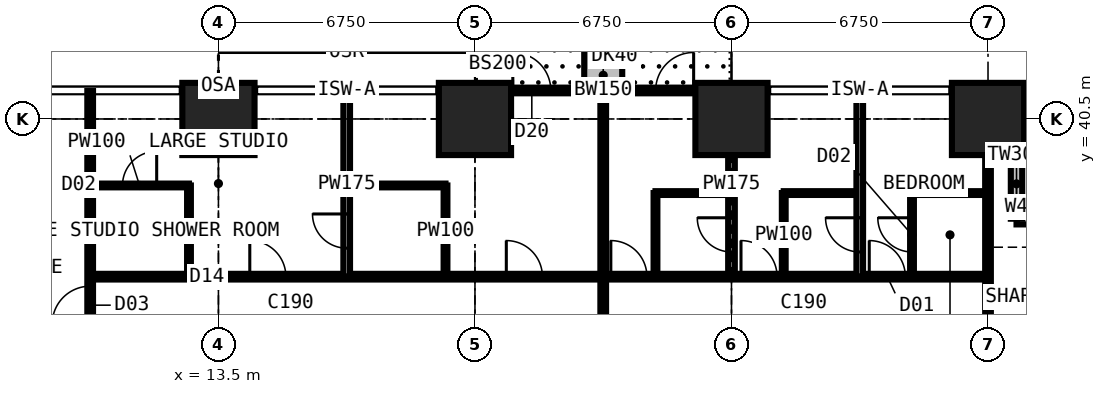
"""IFC4 building model, lengths in metres.
Left out: names, types, materials, properties, quantities, classifications, styles, units other than length and angle.
Written with IfcOpenShell. Run it as: python <this file> out.ifc"""

import sys

from ifc_helpers import new_model, si_unit, direction, frame, frame_2d, origin, origin_2d, place, context, subcontext, project, spatial, rectangle, extrude, element, fill, save


model = new_model("IFC4")
c1 = context("Model", 3, precision=1e-05, world=origin(), true_north=direction((0.0, 1.0)))
c2 = subcontext(c1, "Body", "Model", "MODEL_VIEW")
j1 = project(units=[si_unit("LENGTHUNIT", "METRE"), si_unit("PLANEANGLEUNIT", "RADIAN")], contexts=[c1])
p1 = place(None, origin())
s1 = spatial("IfcSite", under=j1, at=p1, CompositionType="ELEMENT")
p2 = place(p1, origin())
s2 = spatial("IfcBuilding", under=s1, at=p2, CompositionType="ELEMENT")
p3 = place(p2, frame((0.0, 0.0, 28.8)))
s3 = spatial("IfcBuildingStorey", under=s2, at=p3, CompositionType="ELEMENT", Elevation=28.8)
for number, where, z_axis, x_axis in (
    (1, (13.5, 40.5, 0.0), (0.0, 0.0, 1.0), (1.0, 0.0, 0.0)),
    (2, (20.25, 40.5, 0.0), (0.0, 0.0, 1.0), (1.0, 0.0, 0.0)),
    (3, (27.0, 40.5, 0.0), (0.0, 0.0, 1.0), (1.0, 0.0, 0.0)),
    (4, (33.75, 40.5, 0.0), (0.0, 0.0, 1.0), (1.0, 0.0, 0.0)),
):
    element("IfcColumn", number, at=place(p3, frame(where, z_axis=z_axis, x_axis=x_axis)), inside=s3, PredefinedType="COLUMN", context=c2, shape_type="SweptSolid", body=[
        extrude(rectangle(XDim=1.9, YDim=1.9, at=origin_2d()), origin(), (0.0, 0.0, 1.0), 3.6),
    ])
p4 = place(p3, frame((37.875, 37.875, 0.0), z_axis=(0.0, 0.0, 1.0), x_axis=(-1.0, 0.0, 0.0)))
e5 = element("IfcWall", 5, at=p4, inside=s3, PredefinedType="SOLIDWALL", context=c2, shape_type="SweptSolid", body=[
    extrude(rectangle(XDim=3.375, YDim=0.3, at=frame_2d((1.688, 0.0))), origin(), (0.0, 0.0, 1.0), 3.375),
])
p5 = place(p4, frame((0.788, 0.0, 0.6)))
e6 = element("IfcOpeningElement", 6, at=p5, cuts=e5, PredefinedType="OPENING", context=c2, shape_type="SweptSolid", body=[
    extrude(rectangle(XDim=1.8, YDim=2.1, at=frame_2d((0.9, 1.05))), frame((0.0, 0.16, 0.0), z_axis=(0.0, -1.0, 0.0), x_axis=(1.0, 0.0, 0.0)), (0.0, 0.0, 1.0), 0.32),
])
p6 = place(p3, frame((34.5, 37.875, 0.0), z_axis=(0.0, 0.0, 1.0), x_axis=(0.0, 1.0, 0.0)))
e7 = element("IfcWall", 7, at=p6, inside=s3, PredefinedType="SOLIDWALL", context=c2, shape_type="SweptSolid", body=[
    extrude(rectangle(XDim=3.375, YDim=0.3, at=frame_2d((1.688, 0.0))), origin(), (0.0, 0.0, 1.0), 3.375),
])
p7 = place(p6, frame((0.317, 0.0, 0.9)))
e8 = element("IfcOpeningElement", 8, at=p7, cuts=e7, PredefinedType="OPENING", context=c2, shape_type="SweptSolid", body=[
    extrude(rectangle(XDim=1.2, YDim=1.8, at=frame_2d((0.6, 0.9))), frame((0.0, 0.16, 0.0), z_axis=(0.0, -1.0, 0.0), x_axis=(1.0, 0.0, 0.0)), (0.0, 0.0, 1.0), 0.32),
])
p8 = place(p3, frame((20.25, 41.25, 0.0), z_axis=(0.0, 0.0, 1.0), x_axis=(1.0, 0.0, 0.0)))
e9 = element("IfcWall", 9, at=p8, inside=s3, PredefinedType="SOLIDWALL", context=c2, shape_type="SweptSolid", body=[
    extrude(rectangle(XDim=6.75, YDim=0.15, at=frame_2d((3.375, 0.0))), origin(), (0.0, 0.0, 1.0), 3.375),
])
p9 = place(p8, frame((0.996, 0.0, 0.0)))
e10 = element("IfcOpeningElement", 10, at=p9, cuts=e9, PredefinedType="OPENING", context=c2, shape_type="SweptSolid", body=[
    extrude(rectangle(XDim=1.0, YDim=2.2, at=frame_2d((0.5, 1.1))), frame((0.0, 0.085, 0.0), z_axis=(0.0, -1.0, 0.0), x_axis=(1.0, 0.0, 0.0)), (0.0, 0.0, 1.0), 0.17),
])
p10 = place(p8, frame((2.042, 0.0, 0.9)))
e11 = element("IfcOpeningElement", 11, at=p10, cuts=e9, PredefinedType="OPENING", context=c2, shape_type="SweptSolid", body=[
    extrude(rectangle(XDim=1.2, YDim=1.8, at=frame_2d((0.6, 0.9))), frame((0.0, 0.085, 0.0), z_axis=(0.0, -1.0, 0.0), x_axis=(1.0, 0.0, 0.0)), (0.0, 0.0, 1.0), 0.17),
])
p11 = place(p8, frame((4.754, 0.0, 0.0)))
e12 = element("IfcOpeningElement", 12, at=p11, cuts=e9, PredefinedType="OPENING", context=c2, shape_type="SweptSolid", body=[
    extrude(rectangle(XDim=1.0, YDim=2.2, at=frame_2d((0.5, 1.1))), frame((0.0, 0.085, 0.0), z_axis=(0.0, -1.0, 0.0), x_axis=(1.0, 0.0, 0.0)), (0.0, 0.0, 1.0), 0.17),
])
p12 = place(p8, frame((3.508, 0.0, 0.9)))
e13 = element("IfcOpeningElement", 13, at=p12, cuts=e9, PredefinedType="OPENING", context=c2, shape_type="SweptSolid", body=[
    extrude(rectangle(XDim=1.2, YDim=1.8, at=frame_2d((0.6, 0.9))), frame((0.0, 0.085, 0.0), z_axis=(0.0, -1.0, 0.0), x_axis=(1.0, 0.0, 0.0)), (0.0, 0.0, 1.0), 0.17),
])
p13 = place(p3, frame((23.625, 41.35, 0.0), z_axis=(0.0, 0.0, 1.0), x_axis=(0.0, 1.0, 0.0)))
e14 = element("IfcWall", 14, at=p13, inside=s3, PredefinedType="USERDEFINED", context=c2, shape_type="SweptSolid", body=[
    extrude(rectangle(XDim=2.2, YDim=1.0, at=frame_2d((1.1, 0.0))), origin(), (0.0, 0.0, 1.0), 0.9),
])
p14 = place(p3, frame((10.125, 30.375, 0.0), z_axis=(0.0, 0.0, 1.0), x_axis=(0.0, 1.0, 0.0)))
e15 = element("IfcWall", 15, at=p14, inside=s3, PredefinedType="PARTITIONING", context=c2, shape_type="SweptSolid", body=[
    extrude(rectangle(XDim=10.859, YDim=0.15, at=frame_2d((5.429, 0.0))), origin(), (0.0, 0.0, 1.0), 3.375),
])
p15 = place(p14, frame((4.725, 0.0, 0.0)))
e16 = element("IfcOpeningElement", 16, at=p15, cuts=e15, PredefinedType="OPENING", context=c2, shape_type="SweptSolid", body=[
    extrude(rectangle(XDim=1.0, YDim=2.2, at=frame_2d((0.5, 1.1))), frame((0.0, 0.085, 0.0), z_axis=(0.0, -1.0, 0.0), x_axis=(1.0, 0.0, 0.0)), (0.0, 0.0, 1.0), 0.17),
])
p16 = place(p3, frame((10.125, 36.35, 0.0), z_axis=(0.0, 0.0, 1.0), x_axis=(1.0, 0.0, 0.0)))
e17 = element("IfcWall", 17, at=p16, inside=s3, PredefinedType="PARTITIONING", context=c2, shape_type="SweptSolid", body=[
    extrude(rectangle(XDim=23.625, YDim=0.15, at=frame_2d((11.812, 0.0))), origin(), (0.0, 0.0, 1.0), 3.375),
])
p17 = place(p16, frame((20.5, 0.0, 0.0)))
e18 = element("IfcOpeningElement", 18, at=p17, cuts=e17, PredefinedType="OPENING", context=c2, shape_type="SweptSolid", body=[
    extrude(rectangle(XDim=0.95, YDim=2.2, at=frame_2d((0.475, 1.1))), frame((0.0, 0.085, 0.0), z_axis=(0.0, -1.0, 0.0), x_axis=(1.0, 0.0, 0.0)), (0.0, 0.0, 1.0), 0.17),
])
p18 = place(p16, frame((17.125, 0.0, 0.0)))
e19 = element("IfcOpeningElement", 19, at=p18, cuts=e17, PredefinedType="OPENING", context=c2, shape_type="SweptSolid", body=[
    extrude(rectangle(XDim=0.95, YDim=2.2, at=frame_2d((0.475, 1.1))), frame((0.0, 0.085, 0.0), z_axis=(0.0, -1.0, 0.0), x_axis=(1.0, 0.0, 0.0)), (0.0, 0.0, 1.0), 0.17),
])
p19 = place(p16, frame((13.7, 0.0, 0.0)))
e20 = element("IfcOpeningElement", 20, at=p19, cuts=e17, PredefinedType="OPENING", context=c2, shape_type="SweptSolid", body=[
    extrude(rectangle(XDim=0.95, YDim=2.2, at=frame_2d((0.475, 1.1))), frame((0.0, 0.085, 0.0), z_axis=(0.0, -1.0, 0.0), x_axis=(1.0, 0.0, 0.0)), (0.0, 0.0, 1.0), 0.17),
])
p20 = place(p16, frame((4.2, 0.0, 0.0)))
e21 = element("IfcOpeningElement", 21, at=p20, cuts=e17, PredefinedType="OPENING", context=c2, shape_type="SweptSolid", body=[
    extrude(rectangle(XDim=0.95, YDim=2.2, at=frame_2d((0.475, 1.1))), frame((0.0, 0.085, 0.0), z_axis=(0.0, -1.0, 0.0), x_axis=(1.0, 0.0, 0.0)), (0.0, 0.0, 1.0), 0.17),
])
p21 = place(p16, frame((10.95, 0.0, 0.0)))
e22 = element("IfcOpeningElement", 22, at=p21, cuts=e17, PredefinedType="OPENING", context=c2, shape_type="SweptSolid", body=[
    extrude(rectangle(XDim=0.95, YDim=2.2, at=frame_2d((0.475, 1.1))), frame((0.0, 0.085, 0.0), z_axis=(0.0, -1.0, 0.0), x_axis=(1.0, 0.0, 0.0)), (0.0, 0.0, 1.0), 0.17),
])
p22 = place(p3, frame((10.125, 38.75, 0.0), z_axis=(0.0, 0.0, 1.0), x_axis=(1.0, 0.0, 0.0)))
e23 = element("IfcWall", 23, at=p22, inside=s3, PredefinedType="PARTITIONING", context=c2, shape_type="SweptSolid", body=[
    extrude(rectangle(XDim=2.6, YDim=0.1, at=frame_2d((1.3, 0.0))), origin(), (0.0, 0.0, 1.0), 3.375),
])
p23 = place(p22, frame((0.85, 0.0, 0.0)))
e24 = element("IfcOpeningElement", 24, at=p23, cuts=e23, PredefinedType="OPENING", context=c2, shape_type="SweptSolid", body=[
    extrude(rectangle(XDim=0.9, YDim=2.2, at=frame_2d((0.45, 1.1))), frame((0.0, 0.06, 0.0), z_axis=(0.0, -1.0, 0.0), x_axis=(1.0, 0.0, 0.0)), (0.0, 0.0, 1.0), 0.12),
])
p24 = place(p3, frame((12.725, 36.35, 0.0), z_axis=(0.0, 0.0, 1.0), x_axis=(0.0, 1.0, 0.0)))
e25 = element("IfcWall", 25, at=p24, inside=s3, PredefinedType="PARTITIONING", context=c2, shape_type="SweptSolid", body=[
    extrude(rectangle(XDim=2.4, YDim=0.1, at=frame_2d((1.2, 0.0))), origin(), (0.0, 0.0, 1.0), 3.375),
])
p25 = place(p3, frame((16.875, 36.35, 0.0), z_axis=(0.0, 0.0, 1.0), x_axis=(0.0, 1.0, 0.0)))
e26 = element("IfcWall", 26, at=p25, inside=s3, PredefinedType="PARTITIONING", context=c2, shape_type="SweptSolid", body=[
    extrude(rectangle(XDim=4.884, YDim=0.175, at=frame_2d((2.442, 0.0))), origin(), (0.0, 0.0, 1.0), 3.375),
])
p26 = place(p25, frame((0.75, 0.0, 0.0)))
e27 = element("IfcOpeningElement", 27, at=p26, cuts=e26, PredefinedType="OPENING", context=c2, shape_type="SweptSolid", body=[
    extrude(rectangle(XDim=0.9, YDim=2.2, at=frame_2d((0.45, 1.1))), frame((0.0, 0.097, 0.0), z_axis=(0.0, -1.0, 0.0), x_axis=(1.0, 0.0, 0.0)), (0.0, 0.0, 1.0), 0.195),
])
p27 = place(p3, frame((16.875, 38.75, 0.0), z_axis=(0.0, 0.0, 1.0), x_axis=(1.0, 0.0, 0.0)))
e28 = element("IfcWall", 28, at=p27, inside=s3, PredefinedType="PARTITIONING", context=c2, shape_type="SweptSolid", body=[
    extrude(rectangle(XDim=2.6, YDim=0.1, at=frame_2d((1.3, 0.0))), origin(), (0.0, 0.0, 1.0), 3.375),
])
p28 = place(p3, frame((19.475, 36.35, 0.0), z_axis=(0.0, 0.0, 1.0), x_axis=(0.0, 1.0, 0.0)))
e29 = element("IfcWall", 29, at=p28, inside=s3, PredefinedType="PARTITIONING", context=c2, shape_type="SweptSolid", body=[
    extrude(rectangle(XDim=2.4, YDim=0.1, at=frame_2d((1.2, 0.0))), origin(), (0.0, 0.0, 1.0), 3.375),
])
p29 = place(p3, frame((23.625, 29.2, 0.0), z_axis=(0.0, 0.0, 1.0), x_axis=(0.0, 1.0, 0.0)))
e30 = element("IfcWall", 30, at=p29, inside=s3, PredefinedType="PARTITIONING", context=c2, shape_type="SweptSolid", body=[
    extrude(rectangle(XDim=12.034, YDim=0.15, at=frame_2d((6.017, 0.0))), origin(), (0.0, 0.0, 1.0), 3.375),
])
p30 = place(p3, frame((25.0, 36.35, 0.0), z_axis=(0.0, 0.0, 1.0), x_axis=(0.0, 1.0, 0.0)))
e31 = element("IfcWall", 31, at=p30, inside=s3, PredefinedType="PARTITIONING", context=c2, shape_type="SweptSolid", body=[
    extrude(rectangle(XDim=2.2, YDim=0.1, at=frame_2d((1.1, 0.0))), origin(), (0.0, 0.0, 1.0), 3.375),
])
p31 = place(p3, frame((25.0, 38.55, 0.0), z_axis=(0.0, 0.0, 1.0), x_axis=(1.0, 0.0, 0.0)))
e32 = element("IfcWall", 32, at=p31, inside=s3, PredefinedType="PARTITIONING", context=c2, shape_type="SweptSolid", body=[
    extrude(rectangle(XDim=2.0, YDim=0.1, at=frame_2d((1.0, 0.0))), origin(), (0.0, 0.0, 1.0), 3.375),
])
p32 = place(p3, frame((27.0, 36.35, 0.0), z_axis=(0.0, 0.0, 1.0), x_axis=(0.0, 1.0, 0.0)))
e33 = element("IfcWall", 33, at=p32, inside=s3, PredefinedType="PARTITIONING", context=c2, shape_type="SweptSolid", body=[
    extrude(rectangle(XDim=4.884, YDim=0.175, at=frame_2d((2.442, 0.0))), origin(), (0.0, 0.0, 1.0), 2.877),
])
p33 = place(p32, frame((0.65, 0.0, 0.0)))
e34 = element("IfcOpeningElement", 34, at=p33, cuts=e33, PredefinedType="OPENING", context=c2, shape_type="SweptSolid", body=[
    extrude(rectangle(XDim=0.9, YDim=2.2, at=frame_2d((0.45, 1.1))), frame((0.0, 0.097, 0.0), z_axis=(0.0, -1.0, 0.0), x_axis=(1.0, 0.0, 0.0)), (0.0, 0.0, 1.0), 0.195),
])
p34 = place(p3, frame((28.375, 36.35, 0.0), z_axis=(0.0, 0.0, 1.0), x_axis=(0.0, 1.0, 0.0)))
e35 = element("IfcWall", 35, at=p34, inside=s3, PredefinedType="PARTITIONING", context=c2, shape_type="SweptSolid", body=[
    extrude(rectangle(XDim=2.2, YDim=0.1, at=frame_2d((1.1, 0.0))), origin(), (0.0, 0.0, 1.0), 3.375),
])
p35 = place(p3, frame((28.375, 38.55, 0.0), z_axis=(0.0, 0.0, 1.0), x_axis=(1.0, 0.0, 0.0)))
e36 = element("IfcWall", 36, at=p35, inside=s3, PredefinedType="PARTITIONING", context=c2, shape_type="SweptSolid", body=[
    extrude(rectangle(XDim=2.0, YDim=0.1, at=frame_2d((1.0, 0.0))), origin(), (0.0, 0.0, 1.0), 3.375),
])
p36 = place(p3, frame((30.375, 36.35, 0.0), z_axis=(0.0, 0.0, 1.0), x_axis=(0.0, 1.0, 0.0)))
e37 = element("IfcWall", 37, at=p36, inside=s3, PredefinedType="PARTITIONING", context=c2, shape_type="SweptSolid", body=[
    extrude(rectangle(XDim=4.884, YDim=0.175, at=frame_2d((2.442, 0.0))), origin(), (0.0, 0.0, 1.0), 3.375),
])
p37 = place(p36, frame((0.65, 0.0, 0.0)))
e38 = element("IfcOpeningElement", 38, at=p37, cuts=e37, PredefinedType="OPENING", context=c2, shape_type="SweptSolid", body=[
    extrude(rectangle(XDim=0.9, YDim=2.2, at=frame_2d((0.45, 1.1))), frame((0.0, 0.097, 0.0), z_axis=(0.0, -1.0, 0.0), x_axis=(1.0, 0.0, 0.0)), (0.0, 0.0, 1.0), 0.195),
])
p38 = place(p3, frame((31.75, 36.35, 0.0), z_axis=(0.0, 0.0, 1.0), x_axis=(0.0, 1.0, 0.0)))
e39 = element("IfcWall", 39, at=p38, inside=s3, PredefinedType="PARTITIONING", context=c2, shape_type="SweptSolid", body=[
    extrude(rectangle(XDim=2.2, YDim=0.1, at=frame_2d((1.1, 0.0))), origin(), (0.0, 0.0, 1.0), 3.375),
])
p39 = place(p38, frame((0.65, 0.0, 0.0)))
e40 = element("IfcOpeningElement", 40, at=p39, cuts=e39, PredefinedType="OPENING", context=c2, shape_type="SweptSolid", body=[
    extrude(rectangle(XDim=0.9, YDim=2.2, at=frame_2d((0.45, 1.1))), frame((0.0, 0.06, 0.0), z_axis=(0.0, -1.0, 0.0), x_axis=(1.0, 0.0, 0.0)), (0.0, 0.0, 1.0), 0.12),
])
p40 = place(p3, frame((31.75, 38.55, 0.0), z_axis=(0.0, 0.0, 1.0), x_axis=(1.0, 0.0, 0.0)))
e41 = element("IfcWall", 41, at=p40, inside=s3, PredefinedType="PARTITIONING", context=c2, shape_type="SweptSolid", body=[
    extrude(rectangle(XDim=2.0, YDim=0.1, at=frame_2d((1.0, 0.0))), origin(), (0.0, 0.0, 1.0), 3.375),
])
p41 = place(p3, frame((33.75, 30.375, 0.0), z_axis=(0.0, 0.0, 1.0), x_axis=(0.0, 1.0, 0.0)))
e42 = element("IfcWall", 42, at=p41, inside=s3, PredefinedType="PARTITIONING", context=c2, shape_type="SweptSolid", body=[
    extrude(rectangle(XDim=10.859, YDim=0.15, at=frame_2d((5.429, 0.0))), origin(), (0.0, 0.0, 1.0), 2.877),
])
p42 = place(p41, frame((1.4, 0.0, 0.0)))
e43 = element("IfcOpeningElement", 43, at=p42, cuts=e42, PredefinedType="OPENING", context=c2, shape_type="SweptSolid", body=[
    extrude(rectangle(XDim=1.0, YDim=2.2, at=frame_2d((0.5, 1.1))), frame((0.0, 0.085, 0.0), z_axis=(0.0, -1.0, 0.0), x_axis=(1.0, 0.0, 0.0)), (0.0, 0.0, 1.0), 0.17),
])
p43 = place(p7, origin())
e44 = element("IfcWindow", 44, at=p43, inside=s3, PartitioningType="SINGLE_PANEL", PredefinedType="WINDOW", context=c2, shape_type="SweptSolid", body=[
    extrude(rectangle(XDim=1.2, YDim=1.8, at=frame_2d((0.6, 0.9))), frame((0.0, 0.03, 0.0), z_axis=(0.0, -1.0, 0.0), x_axis=(1.0, 0.0, 0.0)), (0.0, 0.0, 1.0), 0.06),
])
fill(e8, e44)
p44 = place(p9, origin())
e45 = element("IfcDoor", 45, at=p44, inside=s3, OperationType="SINGLE_SWING_LEFT", PredefinedType="DOOR", context=c2, shape_type="SweptSolid", body=[
    extrude(rectangle(XDim=1.0, YDim=2.2, at=frame_2d((0.5, 1.1))), frame((0.0, 0.025, 0.0), z_axis=(0.0, -1.0, 0.0), x_axis=(1.0, 0.0, 0.0)), (0.0, 0.0, 1.0), 0.05),
])
fill(e10, e45)
p45 = place(p10, origin())
e46 = element("IfcWindow", 46, at=p45, inside=s3, PartitioningType="SINGLE_PANEL", PredefinedType="WINDOW", context=c2, shape_type="SweptSolid", body=[
    extrude(rectangle(XDim=1.2, YDim=1.8, at=frame_2d((0.6, 0.9))), frame((0.0, 0.03, 0.0), z_axis=(0.0, -1.0, 0.0), x_axis=(1.0, 0.0, 0.0)), (0.0, 0.0, 1.0), 0.06),
])
fill(e11, e46)
p46 = place(p11, origin())
e47 = element("IfcDoor", 47, at=p46, inside=s3, OperationType="SINGLE_SWING_RIGHT", PredefinedType="DOOR", context=c2, shape_type="SweptSolid", body=[
    extrude(rectangle(XDim=1.0, YDim=2.2, at=frame_2d((0.5, 1.1))), frame((0.0, 0.025, 0.0), z_axis=(0.0, -1.0, 0.0), x_axis=(1.0, 0.0, 0.0)), (0.0, 0.0, 1.0), 0.05),
])
fill(e12, e47)
p47 = place(p12, origin())
e48 = element("IfcWindow", 48, at=p47, inside=s3, PartitioningType="SINGLE_PANEL", PredefinedType="WINDOW", context=c2, shape_type="SweptSolid", body=[
    extrude(rectangle(XDim=1.2, YDim=1.8, at=frame_2d((0.6, 0.9))), frame((0.0, 0.03, 0.0), z_axis=(0.0, -1.0, 0.0), x_axis=(1.0, 0.0, 0.0)), (0.0, 0.0, 1.0), 0.06),
])
fill(e13, e48)
p48 = place(p17, origin())
e49 = element("IfcDoor", 49, at=p48, inside=s3, OperationType="SINGLE_SWING_LEFT", PredefinedType="DOOR", context=c2, shape_type="SweptSolid", body=[
    extrude(rectangle(XDim=0.95, YDim=2.2, at=frame_2d((0.475, 1.1))), frame((0.0, 0.025, 0.0), z_axis=(0.0, -1.0, 0.0), x_axis=(1.0, 0.0, 0.0)), (0.0, 0.0, 1.0), 0.05),
])
fill(e18, e49)
p49 = place(p39, origin())
e50 = element("IfcDoor", 50, at=p49, inside=s3, OperationType="SINGLE_SWING_RIGHT", PredefinedType="DOOR", context=c2, shape_type="SweptSolid", body=[
    extrude(rectangle(XDim=0.9, YDim=2.2, at=frame_2d((0.45, 1.1))), frame((0.0, 0.025, 0.0), z_axis=(0.0, -1.0, 0.0), x_axis=(1.0, 0.0, 0.0)), (0.0, 0.0, 1.0), 0.05),
])
fill(e40, e50)
p50 = place(p18, origin())
e51 = element("IfcDoor", 51, at=p50, inside=s3, OperationType="SINGLE_SWING_LEFT", PredefinedType="DOOR", context=c2, shape_type="SweptSolid", body=[
    extrude(rectangle(XDim=0.95, YDim=2.2, at=frame_2d((0.475, 1.1))), frame((0.0, 0.025, 0.0), z_axis=(0.0, -1.0, 0.0), x_axis=(1.0, 0.0, 0.0)), (0.0, 0.0, 1.0), 0.05),
])
fill(e19, e51)
p51 = place(p37, origin())
e52 = element("IfcDoor", 52, at=p51, inside=s3, OperationType="SINGLE_SWING_RIGHT", PredefinedType="DOOR", context=c2, shape_type="SweptSolid", body=[
    extrude(rectangle(XDim=0.9, YDim=2.2, at=frame_2d((0.45, 1.1))), frame((0.0, 0.025, 0.0), z_axis=(0.0, -1.0, 0.0), x_axis=(1.0, 0.0, 0.0)), (0.0, 0.0, 1.0), 0.05),
])
fill(e38, e52)
p52 = place(p19, origin())
e53 = element("IfcDoor", 53, at=p52, inside=s3, OperationType="SINGLE_SWING_LEFT", PredefinedType="DOOR", context=c2, shape_type="SweptSolid", body=[
    extrude(rectangle(XDim=0.95, YDim=2.2, at=frame_2d((0.475, 1.1))), frame((0.0, 0.025, 0.0), z_axis=(0.0, -1.0, 0.0), x_axis=(1.0, 0.0, 0.0)), (0.0, 0.0, 1.0), 0.05),
])
fill(e20, e53)
p53 = place(p33, origin())
e54 = element("IfcDoor", 54, at=p53, inside=s3, OperationType="SINGLE_SWING_RIGHT", PredefinedType="DOOR", context=c2, shape_type="SweptSolid", body=[
    extrude(rectangle(XDim=0.9, YDim=2.2, at=frame_2d((0.45, 1.1))), frame((0.0, 0.025, 0.0), z_axis=(0.0, -1.0, 0.0), x_axis=(1.0, 0.0, 0.0)), (0.0, 0.0, 1.0), 0.05),
])
fill(e34, e54)
p54 = place(p20, origin())
e55 = element("IfcDoor", 55, at=p54, inside=s3, OperationType="SINGLE_SWING_LEFT", PredefinedType="DOOR", context=c2, shape_type="SweptSolid", body=[
    extrude(rectangle(XDim=0.95, YDim=2.2, at=frame_2d((0.475, 1.1))), frame((0.0, 0.025, 0.0), z_axis=(0.0, -1.0, 0.0), x_axis=(1.0, 0.0, 0.0)), (0.0, 0.0, 1.0), 0.05),
])
fill(e21, e55)
p55 = place(p23, origin())
e56 = element("IfcDoor", 56, at=p55, inside=s3, OperationType="SINGLE_SWING_RIGHT", PredefinedType="DOOR", context=c2, shape_type="SweptSolid", body=[
    extrude(rectangle(XDim=0.9, YDim=2.2, at=frame_2d((0.45, 1.1))), frame((0.0, 0.025, 0.0), z_axis=(0.0, -1.0, 0.0), x_axis=(1.0, 0.0, 0.0)), (0.0, 0.0, 1.0), 0.05),
])
fill(e24, e56)
p56 = place(p21, origin())
e57 = element("IfcDoor", 57, at=p56, inside=s3, OperationType="SINGLE_SWING_LEFT", PredefinedType="DOOR", context=c2, shape_type="SweptSolid", body=[
    extrude(rectangle(XDim=0.95, YDim=2.2, at=frame_2d((0.475, 1.1))), frame((0.0, 0.025, 0.0), z_axis=(0.0, -1.0, 0.0), x_axis=(1.0, 0.0, 0.0)), (0.0, 0.0, 1.0), 0.05),
])
fill(e22, e57)
p57 = place(p26, origin())
e58 = element("IfcDoor", 58, at=p57, inside=s3, OperationType="SINGLE_SWING_RIGHT", PredefinedType="DOOR", context=c2, shape_type="SweptSolid", body=[
    extrude(rectangle(XDim=0.9, YDim=2.2, at=frame_2d((0.45, 1.1))), frame((0.0, 0.025, 0.0), z_axis=(0.0, -1.0, 0.0), x_axis=(1.0, 0.0, 0.0)), (0.0, 0.0, 1.0), 0.05),
])
fill(e27, e58)
p58 = place(p15, origin())
e59 = element("IfcDoor", 59, at=p58, inside=s3, OperationType="SINGLE_SWING_LEFT", PredefinedType="DOOR", context=c2, shape_type="SweptSolid", body=[
    extrude(rectangle(XDim=1.0, YDim=2.2, at=frame_2d((0.5, 1.1))), frame((0.0, 0.025, 0.0), z_axis=(0.0, -1.0, 0.0), x_axis=(1.0, 0.0, 0.0)), (0.0, 0.0, 1.0), 0.05),
])
fill(e16, e59)
save(model, sys.argv[1])
